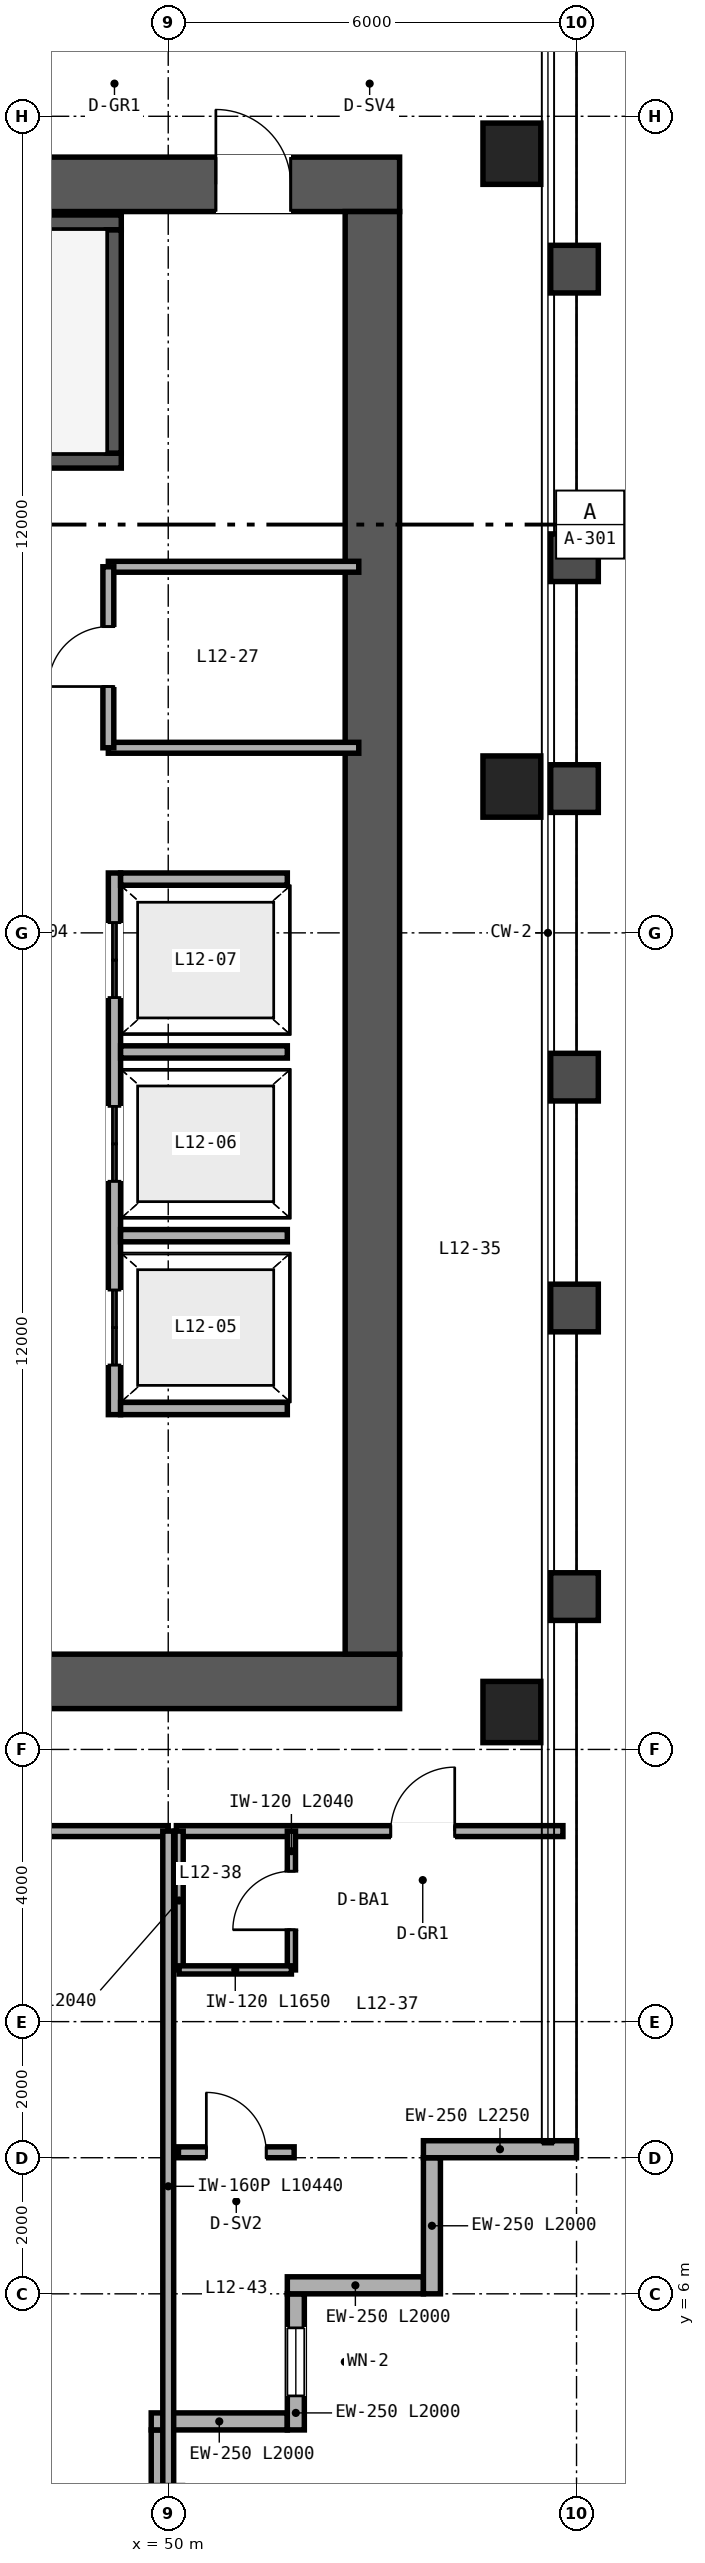
"""IFC4 building model, lengths in metres.
Left out: names, types, materials, properties, quantities, classifications, styles, units other than length and angle.
Written with IfcOpenShell. Run it as: python <this file> out.ifc"""

import sys

from ifc_helpers import new_model, si_unit, direction, frame, frame_2d, origin, origin_2d, place, context, subcontext, project, spatial, rectangle, hollow_rectangle, extrude, source, transform, mapped, element, fill, save


model = new_model("IFC4")
c1 = context("Model", 3, precision=1e-05, world=origin(), true_north=direction((0.0, 1.0)))
c2 = subcontext(c1, "Body", "Model", "MODEL_VIEW")
j1 = project(units=[si_unit("LENGTHUNIT", "METRE"), si_unit("PLANEANGLEUNIT", "RADIAN")], contexts=[c1])
p1 = place(None, origin())
s1 = spatial("IfcSite", under=j1, at=p1, CompositionType="ELEMENT")
p2 = place(p1, origin())
s2 = spatial("IfcBuilding", under=s1, at=p2, CompositionType="ELEMENT")
p3 = place(p2, frame((0.0, 0.0, 52.8)))
s3 = spatial("IfcBuildingStorey", under=s2, at=p3, CompositionType="ELEMENT", Elevation=52.8)
p4 = place(p3, frame((40.6, 15.0, 0.0), z_axis=(0.0, 0.0, 1.0), x_axis=(1.0, 0.0, 0.0)))
e1 = element("IfcWall", 1, at=p4, inside=s3, PredefinedType="SHEAR", context=c2, shape_type="SweptSolid", body=[
    extrude(rectangle(XDim=12.8, YDim=0.8, at=frame_2d((6.4, 0.0))), origin(), (0.0, 0.0, 1.0), 3.35),
])
p5 = place(p4, frame((4.5, 0.0, 0.0)))
e2 = element("IfcOpeningElement", 2, at=p5, cuts=e1, PredefinedType="OPENING", context=c2, shape_type="SweptSolid", body=[
    extrude(rectangle(XDim=1.0, YDim=2.15, at=frame_2d((0.5, 1.075))), frame((0.0, 0.41, 0.0), z_axis=(0.0, -1.0, 0.0), x_axis=(1.0, 0.0, 0.0)), (0.0, 0.0, 1.0), 0.82),
])
p6 = place(p3, frame((40.6, 37.0, 0.0), z_axis=(0.0, 0.0, 1.0), x_axis=(1.0, 0.0, 0.0)))
e3 = element("IfcWall", 3, at=p6, inside=s3, PredefinedType="SHEAR", context=c2, shape_type="SweptSolid", body=[
    extrude(rectangle(XDim=12.8, YDim=0.8, at=frame_2d((6.4, 0.0))), origin(), (0.0, 0.0, 1.0), 3.35),
])
p7 = place(p6, frame((10.1, 0.0, 0.0)))
e4 = element("IfcOpeningElement", 4, at=p7, cuts=e3, PredefinedType="OPENING", context=c2, shape_type="SweptSolid", body=[
    extrude(rectangle(XDim=1.1, YDim=2.15, at=frame_2d((0.55, 1.075))), frame((0.0, 0.41, 0.0), z_axis=(0.0, -1.0, 0.0), x_axis=(1.0, 0.0, 0.0)), (0.0, 0.0, 1.0), 0.82),
])
p8 = place(p3, frame((53.0, 15.4, 0.0), z_axis=(0.0, 0.0, 1.0), x_axis=(0.0, 1.0, 0.0)))
e5 = element("IfcWall", 5, at=p8, inside=s3, PredefinedType="SHEAR", context=c2, shape_type="SweptSolid", body=[
    extrude(rectangle(XDim=21.2, YDim=0.8, at=frame_2d((10.6, 0.0))), origin(), (0.0, 0.0, 1.0), 3.35),
])
p9 = place(p3, frame((41.4, 32.94, 0.0), z_axis=(0.0, 0.0, 1.0), x_axis=(1.0, 0.0, 0.0)))
e6 = element("IfcWall", 6, at=p9, inside=s3, PredefinedType="SHEAR", context=c2, shape_type="SweptSolid", body=[
    extrude(rectangle(XDim=7.91, YDim=0.22, at=frame_2d((3.955, 0.0))), origin(), (0.0, 0.0, 1.0), 3.4),
])
p10 = place(p9, frame((0.52, 0.0, 0.0)))
e7 = element("IfcOpeningElement", 7, at=p10, cuts=e6, PredefinedType="OPENING", context=c2, shape_type="SweptSolid", body=[
    extrude(rectangle(XDim=1.05, YDim=2.15, at=frame_2d((0.525, 1.075))), frame((0.0, 0.12, 0.0), z_axis=(0.0, -1.0, 0.0), x_axis=(1.0, 0.0, 0.0)), (0.0, 0.0, 1.0), 0.24),
])
p11 = place(p3, frame((41.4, 36.44, 0.0), z_axis=(0.0, 0.0, 1.0), x_axis=(1.0, 0.0, 0.0)))
e8 = element("IfcWall", 8, at=p11, inside=s3, PredefinedType="SHEAR", context=c2, shape_type="SweptSolid", body=[
    extrude(rectangle(XDim=7.91, YDim=0.22, at=frame_2d((3.955, 0.0))), origin(), (0.0, 0.0, 1.0), 3.4),
])
p12 = place(p3, frame((49.2, 33.05, 0.0), z_axis=(0.0, 0.0, 1.0), x_axis=(0.0, 1.0, 0.0)))
e9 = element("IfcWall", 9, at=p12, inside=s3, PredefinedType="SHEAR", context=c2, shape_type="SweptSolid", body=[
    extrude(rectangle(XDim=3.28, YDim=0.22, at=frame_2d((1.64, 0.0))), origin(), (0.0, 0.0, 1.0), 3.4),
])
m1 = source(origin(), c2, "Body", "SweptSolid", [
    extrude(hollow_rectangle(XDim=0.85, YDim=0.9, WallThickness=0.04, at=origin_2d()), origin(), (0.0, 0.0, 1.0), 3.35),
])
for number, where, z_axis, x_axis in (
    (10, (55.05, 14.55, 0.0), (0.0, 0.0, 1.0), (1.0, 0.0, 0.0)),
    (11, (55.05, 28.15, 0.0), (0.0, 0.0, 1.0), (1.0, 0.0, 0.0)),
    (12, (55.05, 37.45, 0.0), (0.0, 0.0, 1.0), (1.0, 0.0, 0.0)),
):
    element("IfcColumn", number, at=place(p3, frame(where, z_axis=z_axis, x_axis=x_axis)), inside=s3, PredefinedType="COLUMN", context=c2, shape_type="MappedRepresentation", body=[
        mapped(m1, transform((0.0, 0.0, 0.0), scale=1.0)),
    ])
p13 = place(p3, frame((49.875, 2.0, 0.0), z_axis=(0.0, 0.0, 1.0), x_axis=(0.0, 1.0, 0.0)))
e13 = element("IfcWall", 13, at=p13, inside=s3, PredefinedType="SOLIDWALL", context=c2, shape_type="SweptSolid", body=[
    extrude(rectangle(XDim=2.0, YDim=0.25, at=frame_2d((1.0, 0.0))), origin(), (0.0, 0.0, 1.0), 2.657),
])
p14 = place(p3, frame((49.75, 4.125, 0.0), z_axis=(0.0, 0.0, 1.0), x_axis=(1.0, 0.0, 0.0)))
e14 = element("IfcWall", 14, at=p14, inside=s3, PredefinedType="SOLIDWALL", context=c2, shape_type="SweptSolid", body=[
    extrude(rectangle(XDim=2.0, YDim=0.25, at=frame_2d((1.0, 0.0))), origin(), (0.0, 0.0, 1.0), 3.35),
])
p15 = place(p3, frame((51.875, 4.0, 0.0), z_axis=(0.0, 0.0, 1.0), x_axis=(0.0, 1.0, 0.0)))
e15 = element("IfcWall", 15, at=p15, inside=s3, PredefinedType="SOLIDWALL", context=c2, shape_type="SweptSolid", body=[
    extrude(rectangle(XDim=2.0, YDim=0.25, at=frame_2d((1.0, 0.0))), origin(), (0.0, 0.0, 1.0), 3.35),
])
p16 = place(p15, frame((0.5, 0.0, 0.85)))
e16 = element("IfcOpeningElement", 16, at=p16, cuts=e15, PredefinedType="OPENING", context=c2, shape_type="SweptSolid", body=[
    extrude(rectangle(XDim=1.0, YDim=1.9, at=frame_2d((0.5, 0.95))), frame((0.0, 0.135, 0.0), z_axis=(0.0, -1.0, 0.0), x_axis=(1.0, 0.0, 0.0)), (0.0, 0.0, 1.0), 0.27),
])
for number, where, z_axis, x_axis in (
    (17, (51.75, 6.125, 0.0), (0.0, 0.0, 1.0), (1.0, 0.0, 0.0)),
    (18, (53.875, 6.0, 0.0), (0.0, 0.0, 1.0), (0.0, 1.0, 0.0)),
):
    element("IfcWall", number, at=place(p3, frame(where, z_axis=z_axis, x_axis=x_axis)), inside=s3, PredefinedType="SOLIDWALL", context=c2, shape_type="SweptSolid", body=[
        extrude(rectangle(XDim=2.0, YDim=0.25, at=frame_2d((1.0, 0.0))), origin(), (0.0, 0.0, 1.0), 3.35),
    ])
p17 = place(p3, frame((53.75, 8.125, 0.0), z_axis=(0.0, 0.0, 1.0), x_axis=(1.0, 0.0, 0.0)))
e19 = element("IfcWall", 19, at=p17, inside=s3, PredefinedType="SOLIDWALL", context=c2, shape_type="SweptSolid", body=[
    extrude(rectangle(XDim=2.25, YDim=0.25, at=frame_2d((1.125, 0.0))), origin(), (0.0, 0.0, 1.0), 3.35),
])
p18 = place(p3, frame((49.21, 18.92, 0.0), z_axis=(0.0, 0.0, 1.0), x_axis=(0.0, 1.0, 0.0)))
e20 = element("IfcWall", 20, at=p18, inside=s3, PredefinedType="SOLIDWALL", context=c2, shape_type="SweptSolid", body=[
    extrude(rectangle(XDim=7.96, YDim=0.18, at=frame_2d((3.98, 0.0))), origin(), (0.0, 0.0, 1.0), 3.35),
])
p19 = place(p18, frame((0.73, 0.0, 0.0)))
e21 = element("IfcOpeningElement", 21, at=p19, cuts=e20, PredefinedType="OPENING", context=c2, shape_type="SweptSolid", body=[
    extrude(rectangle(XDim=1.1, YDim=2.2, at=frame_2d((0.55, 1.1))), frame((0.0, 0.1, 0.0), z_axis=(0.0, -1.0, 0.0), x_axis=(1.0, 0.0, 0.0)), (0.0, 0.0, 1.0), 0.2),
])
p20 = place(p18, frame((3.43, 0.0, 0.0)))
e22 = element("IfcOpeningElement", 22, at=p20, cuts=e20, PredefinedType="OPENING", context=c2, shape_type="SweptSolid", body=[
    extrude(rectangle(XDim=1.1, YDim=2.2, at=frame_2d((0.55, 1.1))), frame((0.0, 0.1, 0.0), z_axis=(0.0, -1.0, 0.0), x_axis=(1.0, 0.0, 0.0)), (0.0, 0.0, 1.0), 0.2),
])
p21 = place(p18, frame((6.13, 0.0, 0.0)))
e23 = element("IfcOpeningElement", 23, at=p21, cuts=e20, PredefinedType="OPENING", context=c2, shape_type="SweptSolid", body=[
    extrude(rectangle(XDim=1.1, YDim=2.2, at=frame_2d((0.55, 1.1))), frame((0.0, 0.1, 0.0), z_axis=(0.0, -1.0, 0.0), x_axis=(1.0, 0.0, 0.0)), (0.0, 0.0, 1.0), 0.2),
])
for number, where, z_axis, x_axis in (
    (24, (49.3, 19.01, 0.0), (0.0, 0.0, 1.0), (1.0, 0.0, 0.0)),
    (25, (49.3, 26.79, 0.0), (0.0, 0.0, 1.0), (1.0, 0.0, 0.0)),
    (26, (49.3, 21.55, 0.0), (0.0, 0.0, 1.0), (1.0, 0.0, 0.0)),
    (27, (49.3, 24.25, 0.0), (0.0, 0.0, 1.0), (1.0, 0.0, 0.0)),
):
    element("IfcWall", number, at=place(p3, frame(where, z_axis=z_axis, x_axis=x_axis)), inside=s3, PredefinedType="SOLIDWALL", context=c2, shape_type="SweptSolid", body=[
        extrude(rectangle(XDim=2.45, YDim=0.18, at=frame_2d((1.225, 0.0))), origin(), (0.0, 0.0, 1.0), 3.35),
    ])
p22 = place(p3, frame((49.12, 28.72, 0.0), z_axis=(0.0, 0.0, 1.0), x_axis=(1.0, 0.0, 0.0)))
e28 = element("IfcWall", 28, at=p22, inside=s3, PredefinedType="PARTITIONING", context=c2, shape_type="SweptSolid", body=[
    extrude(rectangle(XDim=3.68, YDim=0.16, at=frame_2d((1.84, 0.0))), origin(), (0.0, 0.0, 1.0), 3.35),
])
p23 = place(p3, frame((49.12, 31.38, 0.0), z_axis=(0.0, 0.0, 1.0), x_axis=(1.0, 0.0, 0.0)))
e29 = element("IfcWall", 29, at=p23, inside=s3, PredefinedType="PARTITIONING", context=c2, shape_type="SweptSolid", body=[
    extrude(rectangle(XDim=3.68, YDim=0.16, at=frame_2d((1.84, 0.0))), origin(), (0.0, 0.0, 1.0), 2.36),
])
p24 = place(p3, frame((49.12, 28.72, 0.0), z_axis=(0.0, 0.0, 1.0), x_axis=(0.0, 1.0, 0.0)))
e30 = element("IfcWall", 30, at=p24, inside=s3, PredefinedType="PARTITIONING", context=c2, shape_type="SweptSolid", body=[
    extrude(rectangle(XDim=2.66, YDim=0.16, at=frame_2d((1.33, 0.0))), origin(), (0.0, 0.0, 1.0), 2.36),
])
p25 = place(p24, frame((0.9, 0.0, 0.0)))
e31 = element("IfcOpeningElement", 31, at=p25, cuts=e30, PredefinedType="OPENING", context=c2, shape_type="SweptSolid", body=[
    extrude(rectangle(XDim=0.88, YDim=2.15, at=frame_2d((0.44, 1.075))), frame((0.0, 0.09, 0.0), z_axis=(0.0, -1.0, 0.0), x_axis=(1.0, 0.0, 0.0)), (0.0, 0.0, 1.0), 0.18),
])
p26 = place(p3, frame((50.12, 12.8, 0.0), z_axis=(0.0, 0.0, 1.0), x_axis=(1.0, 0.0, 0.0)))
e32 = element("IfcWall", 32, at=p26, inside=s3, PredefinedType="PARTITIONING", context=c2, shape_type="SweptSolid", body=[
    extrude(rectangle(XDim=5.68, YDim=0.16, at=frame_2d((2.84, 0.0))), origin(), (0.0, 0.0, 1.0), 3.35),
])
p27 = place(p26, frame((3.15, 0.0, 0.0)))
e33 = element("IfcOpeningElement", 33, at=p27, cuts=e32, PredefinedType="OPENING", context=c2, shape_type="SweptSolid", body=[
    extrude(rectangle(XDim=0.94, YDim=2.15, at=frame_2d((0.47, 1.075))), frame((0.0, 0.09, 0.0), z_axis=(0.0, -1.0, 0.0), x_axis=(1.0, 0.0, 0.0)), (0.0, 0.0, 1.0), 0.18),
])
p28 = place(p3, frame((51.81, 10.76, 0.0), z_axis=(0.0, 0.0, 1.0), x_axis=(0.0, 1.0, 0.0)))
e34 = element("IfcWall", 34, at=p28, inside=s3, PredefinedType="PARTITIONING", context=c2, shape_type="SweptSolid", body=[
    extrude(rectangle(XDim=2.04, YDim=0.12, at=frame_2d((1.02, 0.0))), origin(), (0.0, 0.0, 1.0), 3.35),
])
p29 = place(p28, frame((0.59, 0.0, 0.0)))
e35 = element("IfcOpeningElement", 35, at=p29, cuts=e34, PredefinedType="OPENING", context=c2, shape_type="SweptSolid", body=[
    extrude(rectangle(XDim=0.86, YDim=2.1, at=frame_2d((0.43, 1.05))), frame((0.0, 0.07, 0.0), z_axis=(0.0, -1.0, 0.0), x_axis=(1.0, 0.0, 0.0)), (0.0, 0.0, 1.0), 0.14),
])
p30 = place(p3, frame((50.16, 10.76, 0.0), z_axis=(0.0, 0.0, 1.0), x_axis=(0.0, 1.0, 0.0)))
e36 = element("IfcWall", 36, at=p30, inside=s3, PredefinedType="PARTITIONING", context=c2, shape_type="SweptSolid", body=[
    extrude(rectangle(XDim=2.04, YDim=0.12, at=frame_2d((1.02, 0.0))), origin(), (0.0, 0.0, 1.0), 3.35),
])
p31 = place(p3, frame((50.16, 10.76, 0.0), z_axis=(0.0, 0.0, 1.0), x_axis=(1.0, 0.0, 0.0)))
e37 = element("IfcWall", 37, at=p31, inside=s3, PredefinedType="PARTITIONING", context=c2, shape_type="SweptSolid", body=[
    extrude(rectangle(XDim=1.65, YDim=0.12, at=frame_2d((0.825, 0.0))), origin(), (0.0, 0.0, 1.0), 3.35),
])
p32 = place(p3, frame((50.15, 8.08, 0.0), z_axis=(0.0, 0.0, 1.0), x_axis=(1.0, 0.0, 0.0)))
e38 = element("IfcWall", 38, at=p32, inside=s3, PredefinedType="PARTITIONING", context=c2, shape_type="SweptSolid", body=[
    extrude(rectangle(XDim=1.7, YDim=0.16, at=frame_2d((0.85, 0.0))), origin(), (0.0, 0.0, 1.0), 3.35),
])
p33 = place(p32, frame((0.41, 0.0, 0.0)))
e39 = element("IfcOpeningElement", 39, at=p33, cuts=e38, PredefinedType="OPENING", context=c2, shape_type="SweptSolid", body=[
    extrude(rectangle(XDim=0.88, YDim=2.15, at=frame_2d((0.44, 1.075))), frame((0.0, 0.09, 0.0), z_axis=(0.0, -1.0, 0.0), x_axis=(1.0, 0.0, 0.0)), (0.0, 0.0, 1.0), 0.18),
])
p34 = place(p3, frame((14.0, 12.8, 0.0), z_axis=(0.0, 0.0, 1.0), x_axis=(1.0, 0.0, 0.0)))
e40 = element("IfcWall", 40, at=p34, inside=s3, PredefinedType="PARTITIONING", context=c2, shape_type="SweptSolid", body=[
    extrude(rectangle(XDim=36.0, YDim=0.16, at=frame_2d((18.0, 0.0))), origin(), (0.0, 0.0, 1.0), 2.571),
])
p35 = place(p34, frame((5.14, 0.0, 0.0)))
e41 = element("IfcOpeningElement", 41, at=p35, cuts=e40, PredefinedType="OPENING", context=c2, shape_type="SweptSolid", body=[
    extrude(rectangle(XDim=0.94, YDim=2.15, at=frame_2d((0.47, 1.075))), frame((0.0, 0.09, 0.0), z_axis=(0.0, -1.0, 0.0), x_axis=(1.0, 0.0, 0.0)), (0.0, 0.0, 1.0), 0.18),
])
p36 = place(p34, frame((11.34, 0.0, 0.0)))
e42 = element("IfcOpeningElement", 42, at=p36, cuts=e40, PredefinedType="OPENING", context=c2, shape_type="SweptSolid", body=[
    extrude(rectangle(XDim=0.94, YDim=2.15, at=frame_2d((0.47, 1.075))), frame((0.0, 0.09, 0.0), z_axis=(0.0, -1.0, 0.0), x_axis=(1.0, 0.0, 0.0)), (0.0, 0.0, 1.0), 0.18),
])
p37 = place(p34, frame((17.94, 0.0, 0.0)))
e43 = element("IfcOpeningElement", 43, at=p37, cuts=e40, PredefinedType="OPENING", context=c2, shape_type="SweptSolid", body=[
    extrude(rectangle(XDim=0.94, YDim=2.15, at=frame_2d((0.47, 1.075))), frame((0.0, 0.09, 0.0), z_axis=(0.0, -1.0, 0.0), x_axis=(1.0, 0.0, 0.0)), (0.0, 0.0, 1.0), 0.18),
])
p38 = place(p34, frame((21.82, 0.0, 0.0)))
e44 = element("IfcOpeningElement", 44, at=p38, cuts=e40, PredefinedType="OPENING", context=c2, shape_type="SweptSolid", body=[
    extrude(rectangle(XDim=0.96, YDim=2.15, at=frame_2d((0.48, 1.075))), frame((0.0, 0.09, 0.0), z_axis=(0.0, -1.0, 0.0), x_axis=(1.0, 0.0, 0.0)), (0.0, 0.0, 1.0), 0.18),
])
p39 = place(p34, frame((29.54, 0.0, 0.0)))
e45 = element("IfcOpeningElement", 45, at=p39, cuts=e40, PredefinedType="OPENING", context=c2, shape_type="SweptSolid", body=[
    extrude(rectangle(XDim=0.94, YDim=2.15, at=frame_2d((0.47, 1.075))), frame((0.0, 0.09, 0.0), z_axis=(0.0, -1.0, 0.0), x_axis=(1.0, 0.0, 0.0)), (0.0, 0.0, 1.0), 0.18),
])
p40 = place(p34, frame((32.92, 0.0, 0.0)))
e46 = element("IfcOpeningElement", 46, at=p40, cuts=e40, PredefinedType="OPENING", context=c2, shape_type="SweptSolid", body=[
    extrude(rectangle(XDim=0.96, YDim=2.15, at=frame_2d((0.48, 1.075))), frame((0.0, 0.09, 0.0), z_axis=(0.0, -1.0, 0.0), x_axis=(1.0, 0.0, 0.0)), (0.0, 0.0, 1.0), 0.18),
])
p41 = place(p3, frame((50.0, 2.36, 0.0), z_axis=(0.0, 0.0, 1.0), x_axis=(0.0, 1.0, 0.0)))
e47 = element("IfcWall", 47, at=p41, inside=s3, PredefinedType="PARTITIONING", context=c2, shape_type="SweptSolid", body=[
    extrude(rectangle(XDim=10.44, YDim=0.16, at=frame_2d((5.22, 0.0))), origin(), (0.0, 0.0, 1.0), 2.657),
])
m2 = source(origin(), c2, "Body", "SweptSolid", [
    extrude(rectangle(XDim=1.0, YDim=1.9, at=frame_2d((0.5, 0.95))), frame((0.0, 0.03, 0.0), z_axis=(0.0, -1.0, 0.0), x_axis=(1.0, 0.0, 0.0)), (0.0, 0.0, 1.0), 0.06),
])
p42 = place(p16, origin())
e48 = element("IfcWindow", 48, at=p42, inside=s3, PartitioningType="SINGLE_PANEL", PredefinedType="WINDOW", context=c2, shape_type="MappedRepresentation", body=[
    mapped(m2, transform((0.0, 0.0, 0.0), scale=1.0)),
])
fill(e16, e48)
m3 = source(origin(), c2, "Body", "SweptSolid", [
    extrude(rectangle(XDim=1.1, YDim=2.2, at=frame_2d((0.55, 1.1))), frame((0.0, 0.025, 0.0), z_axis=(0.0, -1.0, 0.0), x_axis=(1.0, 0.0, 0.0)), (0.0, 0.0, 1.0), 0.05),
])
p43 = place(p19, origin())
e49 = element("IfcDoor", 49, at=p43, inside=s3, OperationType="DOUBLE_DOOR_SLIDING", PredefinedType="DOOR", context=c2, shape_type="MappedRepresentation", body=[
    mapped(m3, transform((0.0, 0.0, 0.0), scale=1.0)),
])
fill(e21, e49)
p44 = place(p20, origin())
e50 = element("IfcDoor", 50, at=p44, inside=s3, OperationType="DOUBLE_DOOR_SLIDING", PredefinedType="DOOR", context=c2, shape_type="MappedRepresentation", body=[
    mapped(m3, transform((0.0, 0.0, 0.0), scale=1.0)),
])
fill(e22, e50)
p45 = place(p21, origin())
e51 = element("IfcDoor", 51, at=p45, inside=s3, OperationType="DOUBLE_DOOR_SLIDING", PredefinedType="DOOR", context=c2, shape_type="MappedRepresentation", body=[
    mapped(m3, transform((0.0, 0.0, 0.0), scale=1.0)),
])
fill(e23, e51)
m4 = source(origin(), c2, "Body", "SweptSolid", [
    extrude(rectangle(XDim=1.1, YDim=2.15, at=frame_2d((0.55, 1.075))), frame((0.0, 0.025, 0.0), z_axis=(0.0, -1.0, 0.0), x_axis=(1.0, 0.0, 0.0)), (0.0, 0.0, 1.0), 0.05),
])
p46 = place(p7, origin())
e52 = element("IfcDoor", 52, at=p46, inside=s3, OperationType="SINGLE_SWING_LEFT", PredefinedType="DOOR", context=c2, shape_type="MappedRepresentation", body=[
    mapped(m4, transform((0.0, 0.0, 0.0), scale=1.0)),
])
fill(e4, e52)
m5 = source(origin(), c2, "Body", "SweptSolid", [
    extrude(rectangle(XDim=0.88, YDim=2.15, at=frame_2d((0.44, 1.075))), frame((0.0, 0.025, 0.0), z_axis=(0.0, -1.0, 0.0), x_axis=(1.0, 0.0, 0.0)), (0.0, 0.0, 1.0), 0.05),
])
p47 = place(p25, origin())
e53 = element("IfcDoor", 53, at=p47, inside=s3, OperationType="SINGLE_SWING_LEFT", PredefinedType="DOOR", context=c2, shape_type="MappedRepresentation", body=[
    mapped(m5, transform((0.0, 0.0, 0.0), scale=1.0)),
])
fill(e31, e53)
m6 = source(origin(), c2, "Body", "SweptSolid", [
    extrude(rectangle(XDim=0.86, YDim=2.1, at=frame_2d((0.43, 1.05))), frame((0.0, 0.025, 0.0), z_axis=(0.0, -1.0, 0.0), x_axis=(1.0, 0.0, 0.0)), (0.0, 0.0, 1.0), 0.05),
])
p48 = place(p29, origin())
e54 = element("IfcDoor", 54, at=p48, inside=s3, OperationType="SINGLE_SWING_LEFT", PredefinedType="DOOR", context=c2, shape_type="MappedRepresentation", body=[
    mapped(m6, transform((0.0, 0.0, 0.0), scale=1.0)),
])
fill(e35, e54)
m7 = source(origin(), c2, "Body", "SweptSolid", [
    extrude(rectangle(XDim=0.94, YDim=2.15, at=frame_2d((0.47, 1.075))), frame((0.0, 0.025, 0.0), z_axis=(0.0, -1.0, 0.0), x_axis=(1.0, 0.0, 0.0)), (0.0, 0.0, 1.0), 0.05),
])
p49 = place(p27, origin())
e55 = element("IfcDoor", 55, at=p49, inside=s3, OperationType="SINGLE_SWING_RIGHT", PredefinedType="DOOR", context=c2, shape_type="MappedRepresentation", body=[
    mapped(m7, transform((0.0, 0.0, 0.0), scale=1.0)),
])
fill(e33, e55)
p50 = place(p33, origin())
e56 = element("IfcDoor", 56, at=p50, inside=s3, OperationType="SINGLE_SWING_LEFT", PredefinedType="DOOR", context=c2, shape_type="MappedRepresentation", body=[
    mapped(m5, transform((0.0, 0.0, 0.0), scale=1.0)),
])
fill(e39, e56)
save(model, sys.argv[1])
